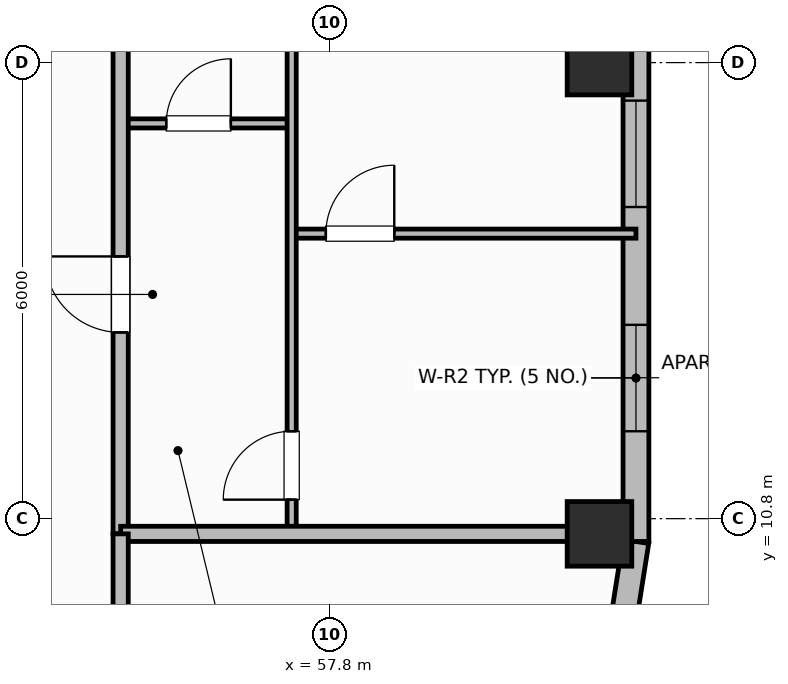
"""IFC4 building model, lengths in metres.
Left out: names, types, materials, properties, quantities, classifications, styles, units other than length and angle.
Written with IfcOpenShell. Run it as: python <this file> out.ifc"""

import sys

from ifc_helpers import new_model, si_unit, direction, frame, frame_2d, origin, origin_2d, place, context, subcontext, project, spatial, rectangle, extrude, element, fill, save


model = new_model("IFC4")
c1 = context("Model", 3, precision=1e-05, world=origin(), true_north=direction((0.0, 1.0)))
c2 = subcontext(c1, "Body", "Model", "MODEL_VIEW")
j1 = project(units=[si_unit("LENGTHUNIT", "METRE"), si_unit("PLANEANGLEUNIT", "RADIAN")], contexts=[c1])
p1 = place(None, origin())
s1 = spatial("IfcSite", under=j1, at=p1, CompositionType="ELEMENT")
p2 = place(p1, origin())
s2 = spatial("IfcBuilding", under=s1, at=p2, CompositionType="ELEMENT")
p3 = place(p2, frame((0.0, 0.0, 207.3)))
s3 = spatial("IfcBuildingStorey", under=s2, at=p3, CompositionType="ELEMENT", Elevation=207.3)
for number, where, z_axis, x_axis in (
    (1, (61.35, 10.6, 0.0), (0.0, 0.0, 1.0), (1.0, 0.0, 0.0)),
    (2, (61.35, 16.8, 0.0), (0.0, 0.0, 1.0), (1.0, 0.0, 0.0)),
):
    element("IfcColumn", number, at=place(p3, frame(where, z_axis=z_axis, x_axis=x_axis)), inside=s3, PredefinedType="COLUMN", context=c2, shape_type="SweptSolid", body=[
        extrude(rectangle(XDim=0.85, YDim=0.85, at=origin_2d()), origin(), (0.0, 0.0, 1.0), 3.7),
    ])
p4 = place(p3, frame((61.652, 9.378, 0.0), z_axis=(0.0, 0.0, 1.0), x_axis=(0.156514556949, 0.987675651954, 0.0)))
e3 = element("IfcWall", 3, at=p4, inside=s3, PredefinedType="SOLIDWALL", context=c2, shape_type="SweptSolid", body=[
    extrude(rectangle(XDim=1.135, YDim=0.34, at=frame_2d((0.568, 0.0))), origin(), (0.0, 0.0, 1.0), 2.72),
])
p5 = place(p3, frame((61.83, 10.5, 0.0), z_axis=(0.0, 0.0, 1.0), x_axis=(0.0, 1.0, 0.0)))
e4 = element("IfcWall", 4, at=p5, inside=s3, PredefinedType="SOLIDWALL", context=c2, shape_type="SweptSolid", body=[
    extrude(rectangle(XDim=13.3, YDim=0.34, at=frame_2d((6.65, 0.0))), origin(), (0.0, 0.0, 1.0), 2.72),
])
p6 = place(p5, frame((1.45, 0.0, 0.75)))
e5 = element("IfcOpeningElement", 5, at=p6, cuts=e4, PredefinedType="OPENING", context=c2, shape_type="SweptSolid", body=[
    extrude(rectangle(XDim=1.4, YDim=1.85, at=frame_2d((0.7, 0.925))), frame((0.0, 0.18, 0.0), z_axis=(0.0, -1.0, 0.0), x_axis=(1.0, 0.0, 0.0)), (0.0, 0.0, 1.0), 0.36),
])
p7 = place(p5, frame((4.4, 0.0, 0.71)))
e6 = element("IfcOpeningElement", 6, at=p7, cuts=e4, PredefinedType="OPENING", context=c2, shape_type="SweptSolid", body=[
    extrude(rectangle(XDim=1.4, YDim=1.85, at=frame_2d((0.7, 0.925))), frame((0.0, 0.18, 0.0), z_axis=(0.0, -1.0, 0.0), x_axis=(1.0, 0.0, 0.0)), (0.0, 0.0, 1.0), 0.36),
])
p8 = place(p5, frame((8.5, 0.0, 0.75)))
e7 = element("IfcOpeningElement", 7, at=p8, cuts=e4, PredefinedType="OPENING", context=c2, shape_type="SweptSolid", body=[
    extrude(rectangle(XDim=1.4, YDim=1.85, at=frame_2d((0.7, 0.925))), frame((0.0, 0.18, 0.0), z_axis=(0.0, -1.0, 0.0), x_axis=(1.0, 0.0, 0.0)), (0.0, 0.0, 1.0), 0.36),
])
p9 = place(p3, frame((55.05, 16.0, 0.0), z_axis=(0.0, 0.0, 1.0), x_axis=(1.0, 0.0, 0.0)))
e8 = element("IfcWall", 8, at=p9, inside=s3, PredefinedType="PARTITIONING", context=c2, shape_type="SweptSolid", body=[
    extrude(rectangle(XDim=2.25, YDim=0.12, at=frame_2d((1.125, 0.0))), origin(), (0.0, 0.0, 1.0), 2.55),
])
p10 = place(p9, frame((0.6, 0.0, 0.0)))
e9 = element("IfcOpeningElement", 9, at=p10, cuts=e8, PredefinedType="OPENING", context=c2, shape_type="SweptSolid", body=[
    extrude(rectangle(XDim=0.85, YDim=2.1, at=frame_2d((0.425, 1.05))), frame((0.0, 0.07, 0.0), z_axis=(0.0, -1.0, 0.0), x_axis=(1.0, 0.0, 0.0)), (0.0, 0.0, 1.0), 0.14),
])
p11 = place(p3, frame((57.3, 14.55, 0.0), z_axis=(0.0, 0.0, 1.0), x_axis=(1.0, 0.0, 0.0)))
e10 = element("IfcWall", 10, at=p11, inside=s3, PredefinedType="PARTITIONING", context=c2, shape_type="SweptSolid", body=[
    extrude(rectangle(XDim=4.53, YDim=0.12, at=frame_2d((2.265, 0.0))), origin(), (0.0, 0.0, 1.0), 2.55),
])
p12 = place(p11, frame((0.45, 0.0, 0.0)))
e11 = element("IfcOpeningElement", 11, at=p12, cuts=e10, PredefinedType="OPENING", context=c2, shape_type="SweptSolid", body=[
    extrude(rectangle(XDim=0.9, YDim=2.1, at=frame_2d((0.45, 1.05))), frame((0.0, 0.07, 0.0), z_axis=(0.0, -1.0, 0.0), x_axis=(1.0, 0.0, 0.0)), (0.0, 0.0, 1.0), 0.14),
])
p13 = place(p3, frame((57.3, 10.64, 0.0), z_axis=(0.0, 0.0, 1.0), x_axis=(0.0, 1.0, 0.0)))
e12 = element("IfcWall", 12, at=p13, inside=s3, PredefinedType="PARTITIONING", context=c2, shape_type="SweptSolid", body=[
    extrude(rectangle(XDim=11.536, YDim=0.12, at=frame_2d((5.768, 0.0))), origin(), (0.0, 0.0, 1.0), 2.55),
])
p14 = place(p13, frame((0.41, 0.0, 0.0)))
e13 = element("IfcOpeningElement", 13, at=p14, cuts=e12, PredefinedType="OPENING", context=c2, shape_type="SweptSolid", body=[
    extrude(rectangle(XDim=0.9, YDim=2.1, at=frame_2d((0.45, 1.05))), frame((0.0, 0.07, 0.0), z_axis=(0.0, -1.0, 0.0), x_axis=(1.0, 0.0, 0.0)), (0.0, 0.0, 1.0), 0.14),
])
p15 = place(p3, frame((55.05, 10.6, 0.0), z_axis=(0.0, 0.0, 1.0), x_axis=(0.0, 1.0, 0.0)))
e14 = element("IfcWall", 14, at=p15, inside=s3, PredefinedType="PARTITIONING", context=c2, shape_type="SweptSolid", body=[
    extrude(rectangle(XDim=35.2, YDim=0.2, at=frame_2d((17.6, 0.0))), origin(), (0.0, 0.0, 1.0), 2.55),
])
p16 = place(p15, frame((2.65, 0.0, 0.0)))
e15 = element("IfcOpeningElement", 15, at=p16, cuts=e14, PredefinedType="OPENING", context=c2, shape_type="SweptSolid", body=[
    extrude(rectangle(XDim=1.0, YDim=2.15, at=frame_2d((0.5, 1.075))), frame((0.0, 0.11, 0.0), z_axis=(0.0, -1.0, 0.0), x_axis=(1.0, 0.0, 0.0)), (0.0, 0.0, 1.0), 0.22),
])
p17 = place(p15, frame((12.166, 0.0, 0.0)))
e16 = element("IfcOpeningElement", 16, at=p17, cuts=e14, PredefinedType="OPENING", context=c2, shape_type="SweptSolid", body=[
    extrude(rectangle(XDim=1.0, YDim=2.15, at=frame_2d((0.5, 1.075))), frame((0.0, 0.11, 0.0), z_axis=(0.0, -1.0, 0.0), x_axis=(1.0, 0.0, 0.0)), (0.0, 0.0, 1.0), 0.22),
])
p18 = place(p15, frame((23.65, 0.0, 0.0)))
e17 = element("IfcOpeningElement", 17, at=p18, cuts=e14, PredefinedType="OPENING", context=c2, shape_type="SweptSolid", body=[
    extrude(rectangle(XDim=1.0, YDim=2.15, at=frame_2d((0.5, 1.075))), frame((0.0, 0.11, 0.0), z_axis=(0.0, -1.0, 0.0), x_axis=(1.0, 0.0, 0.0)), (0.0, 0.0, 1.0), 0.22),
])
p19 = place(p3, frame((55.05, 10.6, 0.0), z_axis=(0.0, 0.0, 1.0), x_axis=(1.0, 0.0, 0.0)))
e18 = element("IfcWall", 18, at=p19, inside=s3, PredefinedType="PARTITIONING", context=c2, shape_type="SweptSolid", body=[
    extrude(rectangle(XDim=6.36, YDim=0.2, at=frame_2d((3.18, 0.0))), origin(), (0.0, 0.0, 1.0), 2.55),
])
p20 = place(p3, frame((55.05, 6.87, 0.0), z_axis=(0.0, 0.0, 1.0), x_axis=(0.0, 1.0, 0.0)))
e19 = element("IfcWall", 19, at=p20, inside=s3, PredefinedType="PARTITIONING", context=c2, shape_type="SweptSolid", body=[
    extrude(rectangle(XDim=3.73, YDim=0.2, at=frame_2d((1.865, 0.0))), origin(), (0.0, 0.0, 1.0), 2.55),
])
p21 = place(p6, origin())
e20 = element("IfcWindow", 20, at=p21, inside=s3, PartitioningType="SINGLE_PANEL", PredefinedType="WINDOW", context=c2, shape_type="SweptSolid", body=[
    extrude(rectangle(XDim=1.4, YDim=1.85, at=frame_2d((0.7, 0.925))), frame((0.0, 0.03, 0.0), z_axis=(0.0, -1.0, 0.0), x_axis=(1.0, 0.0, 0.0)), (0.0, 0.0, 1.0), 0.06),
])
fill(e5, e20)
p22 = place(p7, origin())
e21 = element("IfcWindow", 21, at=p22, inside=s3, PartitioningType="SINGLE_PANEL", PredefinedType="WINDOW", context=c2, shape_type="SweptSolid", body=[
    extrude(rectangle(XDim=1.4, YDim=1.85, at=frame_2d((0.7, 0.925))), frame((0.0, 0.03, 0.0), z_axis=(0.0, -1.0, 0.0), x_axis=(1.0, 0.0, 0.0)), (0.0, 0.0, 1.0), 0.06),
])
fill(e6, e21)
p23 = place(p10, origin())
e22 = element("IfcDoor", 22, at=p23, inside=s3, OperationType="SINGLE_SWING_RIGHT", PredefinedType="DOOR", context=c2, shape_type="SweptSolid", body=[
    extrude(rectangle(XDim=0.85, YDim=2.1, at=frame_2d((0.425, 1.05))), frame((0.0, 0.025, 0.0), z_axis=(0.0, -1.0, 0.0), x_axis=(1.0, 0.0, 0.0)), (0.0, 0.0, 1.0), 0.05),
])
fill(e9, e22)
p24 = place(p12, origin())
e23 = element("IfcDoor", 23, at=p24, inside=s3, OperationType="SINGLE_SWING_RIGHT", PredefinedType="DOOR", context=c2, shape_type="SweptSolid", body=[
    extrude(rectangle(XDim=0.9, YDim=2.1, at=frame_2d((0.45, 1.05))), frame((0.0, 0.025, 0.0), z_axis=(0.0, -1.0, 0.0), x_axis=(1.0, 0.0, 0.0)), (0.0, 0.0, 1.0), 0.05),
])
fill(e11, e23)
p25 = place(p14, origin())
e24 = element("IfcDoor", 24, at=p25, inside=s3, OperationType="SINGLE_SWING_LEFT", PredefinedType="DOOR", context=c2, shape_type="SweptSolid", body=[
    extrude(rectangle(XDim=0.9, YDim=2.1, at=frame_2d((0.45, 1.05))), frame((0.0, 0.025, 0.0), z_axis=(0.0, -1.0, 0.0), x_axis=(1.0, 0.0, 0.0)), (0.0, 0.0, 1.0), 0.05),
])
fill(e13, e24)
p26 = place(p16, origin())
e25 = element("IfcDoor", 25, at=p26, inside=s3, OperationType="SINGLE_SWING_RIGHT", PredefinedType="DOOR", context=c2, shape_type="SweptSolid", body=[
    extrude(rectangle(XDim=1.0, YDim=2.15, at=frame_2d((0.5, 1.075))), frame((0.0, 0.025, 0.0), z_axis=(0.0, -1.0, 0.0), x_axis=(1.0, 0.0, 0.0)), (0.0, 0.0, 1.0), 0.05),
])
fill(e15, e25)
save(model, sys.argv[1])
